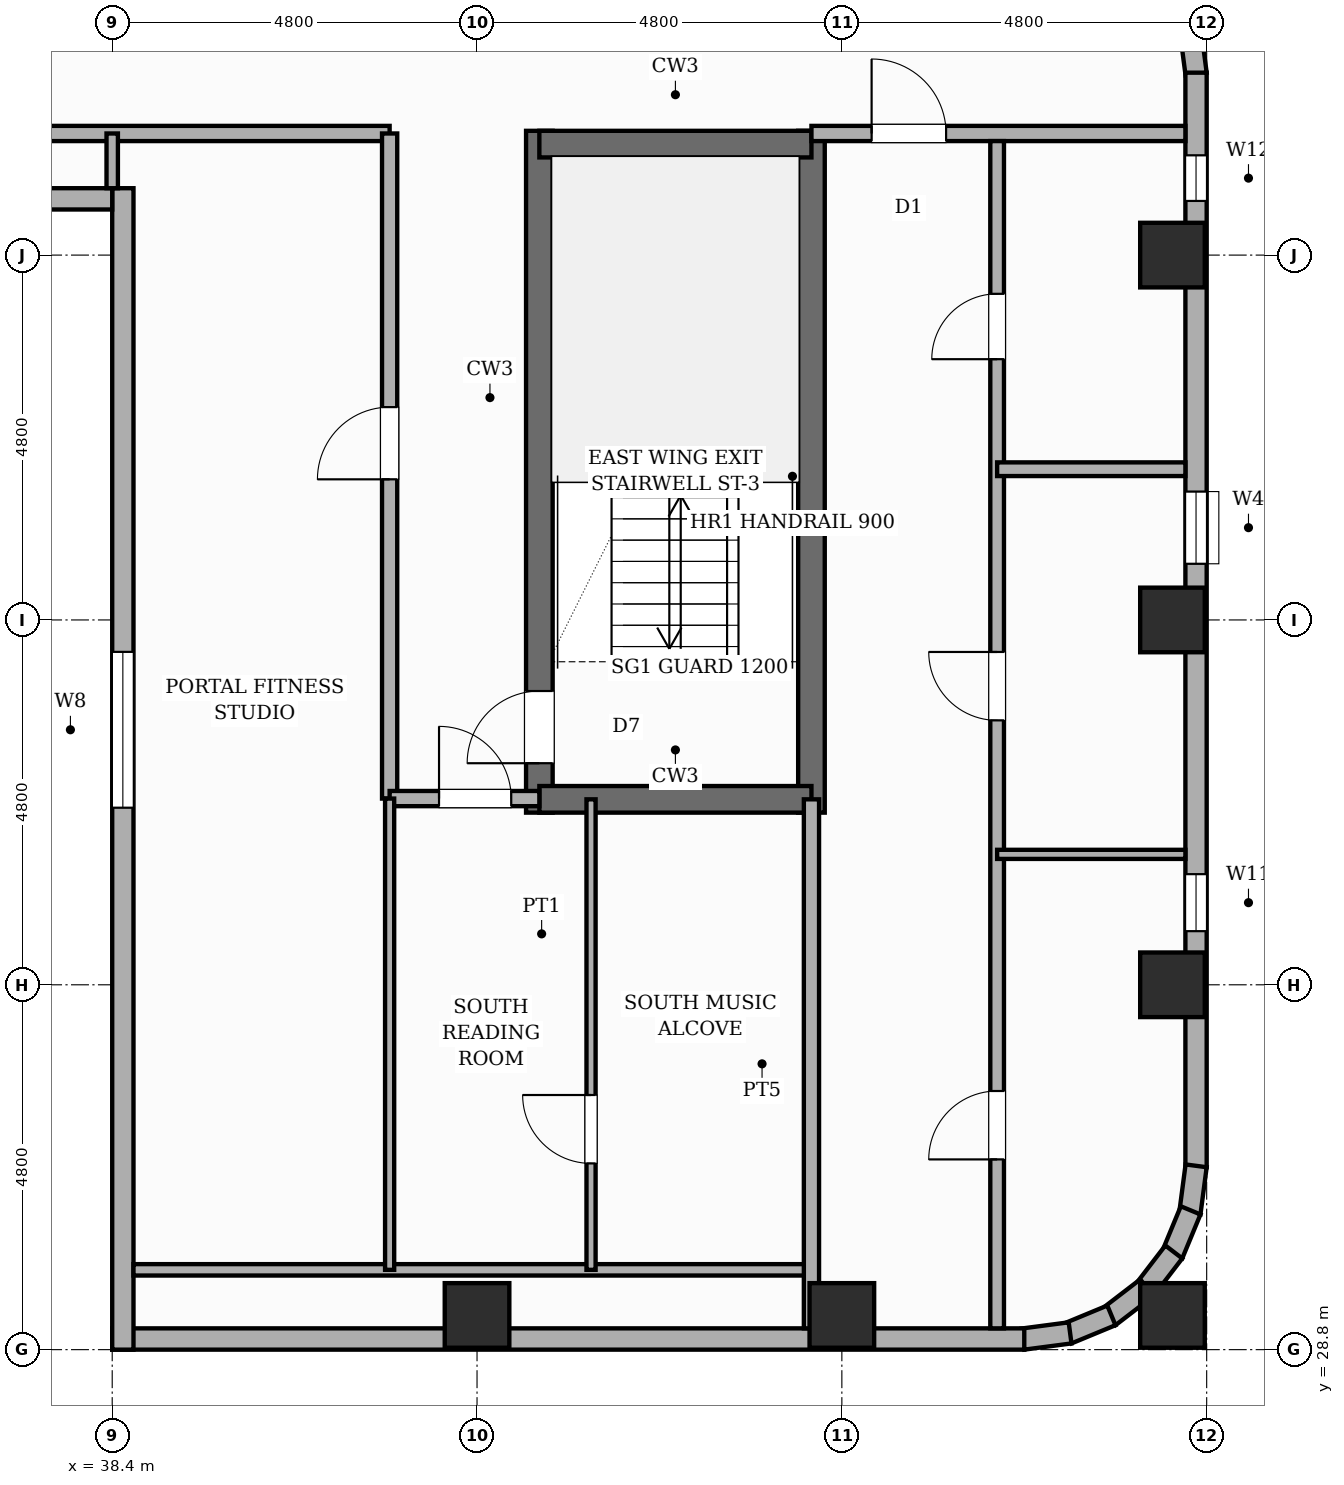
"""IFC4 building model, lengths in metres.
Left out: names, types, materials, properties, quantities, classifications, styles, units other than length and angle.
Written with IfcOpenShell. Run it as: python <this file> out.ifc"""

import sys

from ifc_helpers import new_model, si_unit, direction, frame, frame_2d, origin, origin_2d, place, context, subcontext, project, spatial, rectangle, extrude, element, fill, save


model = new_model("IFC4")
c1 = context("Model", 3, precision=1e-05, world=origin(), true_north=direction((0.0, 1.0)))
c2 = subcontext(c1, "Body", "Model", "MODEL_VIEW")
j1 = project(units=[si_unit("LENGTHUNIT", "METRE"), si_unit("PLANEANGLEUNIT", "RADIAN")], contexts=[c1])
p1 = place(None, origin())
s1 = spatial("IfcSite", under=j1, at=p1, CompositionType="ELEMENT")
p2 = place(p1, origin())
s2 = spatial("IfcBuilding", under=s1, at=p2, CompositionType="ELEMENT")
p3 = place(p2, frame((0.0, 0.0, 203.8)))
s3 = spatial("IfcBuildingStorey", under=s2, at=p3, CompositionType="ELEMENT", Elevation=203.8)
p4 = place(p3, frame((44.02, 35.865, 0.0), z_axis=(0.0, 0.0, 1.0), x_axis=(0.0, 1.0, 0.0)))
e1 = element("IfcWall", 1, at=p4, inside=s3, PredefinedType="SHEAR", context=c2, shape_type="SweptSolid", body=[
    extrude(rectangle(XDim=8.97, YDim=0.35, at=frame_2d((4.485, 0.0))), origin(), (0.0, 0.0, 1.0), 3.6),
])
p5 = place(p4, frame((0.65, 0.0, 0.0)))
e2 = element("IfcOpeningElement", 2, at=p5, cuts=e1, PredefinedType="OPENING", context=c2, shape_type="SweptSolid", body=[
    extrude(rectangle(XDim=0.95, YDim=2.1, at=frame_2d((0.475, 1.05))), frame((0.0, 0.185, 0.0), z_axis=(0.0, -1.0, 0.0), x_axis=(1.0, 0.0, 0.0)), (0.0, 0.0, 1.0), 0.37),
])
p6 = place(p3, frame((47.6, 35.865, 0.0), z_axis=(0.0, 0.0, 1.0), x_axis=(0.0, 1.0, 0.0)))
e3 = element("IfcWall", 3, at=p6, inside=s3, PredefinedType="SHEAR", context=c2, shape_type="SweptSolid", body=[
    extrude(rectangle(XDim=8.97, YDim=0.35, at=frame_2d((4.485, 0.0))), origin(), (0.0, 0.0, 1.0), 3.6),
])
for number, where, z_axis, x_axis in (
    (4, (44.02, 36.04, 0.0), (0.0, 0.0, 1.0), (1.0, 0.0, 0.0)),
    (5, (44.02, 44.66, 0.0), (0.0, 0.0, 1.0), (1.0, 0.0, 0.0)),
):
    element("IfcWall", number, at=place(p3, frame(where, z_axis=z_axis, x_axis=x_axis)), inside=s3, PredefinedType="SHEAR", context=c2, shape_type="SweptSolid", body=[
        extrude(rectangle(XDim=3.58, YDim=0.35, at=frame_2d((1.79, 0.0))), origin(), (0.0, 0.0, 1.0), 3.6),
    ])
for number, where, z_axis, x_axis in (
    (6, (43.2, 29.25, 0.0), (0.0, 0.0, 1.0), (1.0, 0.0, 0.0)),
    (7, (48.0, 29.25, 0.0), (0.0, 0.0, 1.0), (1.0, 0.0, 0.0)),
    (8, (52.35, 29.25, 0.0), (0.0, 0.0, 1.0), (1.0, 0.0, 0.0)),
    (9, (52.35, 33.6, 0.0), (0.0, 0.0, 1.0), (1.0, 0.0, 0.0)),
    (10, (52.35, 38.4, 0.0), (0.0, 0.0, 1.0), (1.0, 0.0, 0.0)),
    (11, (52.35, 43.2, 0.0), (0.0, 0.0, 1.0), (1.0, 0.0, 0.0)),
):
    element("IfcColumn", number, at=place(p3, frame(where, z_axis=z_axis, x_axis=x_axis)), inside=s3, PredefinedType="COLUMN", context=c2, shape_type="SweptSolid", body=[
        extrude(rectangle(XDim=0.85, YDim=0.85, at=origin_2d()), origin(), (0.0, 0.0, 1.0), 3.6),
    ])
p7 = place(p3, frame((52.579, 46.203, 0.0), z_axis=(0.0, 0.0, 1.0), x_axis=(0.130555323746, -0.9914410257, 0.0)))
e12 = element("IfcWall", 12, at=p7, inside=s3, PredefinedType="STANDARD", context=c2, shape_type="SweptSolid", body=[
    extrude(rectangle(XDim=0.626, YDim=0.28, at=frame_2d((0.313, 0.0))), origin(), (0.0, 0.0, 1.0), 2.66),
])
p8 = place(p3, frame((52.66, 45.6, 0.0), z_axis=(0.0, 0.0, 1.0), x_axis=(0.0, -1.0, 0.0)))
e13 = element("IfcWall", 13, at=p8, inside=s3, PredefinedType="STANDARD", context=c2, shape_type="SweptSolid", body=[
    extrude(rectangle(XDim=14.4, YDim=0.28, at=frame_2d((7.2, 0.0))), origin(), (0.0, 0.0, 1.0), 2.66),
])
p9 = place(p8, frame((10.544, 0.0, 0.45)))
e14 = element("IfcOpeningElement", 14, at=p9, cuts=e13, PredefinedType="OPENING", context=c2, shape_type="SweptSolid", body=[
    extrude(rectangle(XDim=0.75, YDim=1.8, at=frame_2d((0.375, 0.9))), frame((0.0, 0.15, 0.0), z_axis=(0.0, -1.0, 0.0), x_axis=(1.0, 0.0, 0.0)), (0.0, 0.0, 1.0), 0.3),
])
p10 = place(p8, frame((1.087, 0.0, 0.45)))
e15 = element("IfcOpeningElement", 15, at=p10, cuts=e13, PredefinedType="OPENING", context=c2, shape_type="SweptSolid", body=[
    extrude(rectangle(XDim=0.6, YDim=1.8, at=frame_2d((0.3, 0.9))), frame((0.0, 0.15, 0.0), z_axis=(0.0, -1.0, 0.0), x_axis=(1.0, 0.0, 0.0)), (0.0, 0.0, 1.0), 0.3),
])
p11 = place(p8, frame((5.511, 0.0, 0.45)))
e16 = element("IfcOpeningElement", 16, at=p11, cuts=e13, PredefinedType="OPENING", context=c2, shape_type="SweptSolid", body=[
    extrude(rectangle(XDim=0.95, YDim=1.8, at=frame_2d((0.475, 0.9))), frame((0.0, 0.15, 0.0), z_axis=(0.0, -1.0, 0.0), x_axis=(1.0, 0.0, 0.0)), (0.0, 0.0, 1.0), 0.3),
])
p12 = place(p3, frame((52.661, 31.218, 0.0), z_axis=(0.0, 0.0, 1.0), x_axis=(-0.130555323746, -0.9914410257, 0.0)))
e17 = element("IfcWall", 17, at=p12, inside=s3, PredefinedType="STANDARD", context=c2, shape_type="SweptSolid", body=[
    extrude(rectangle(XDim=0.626, YDim=0.28, at=frame_2d((0.313, 0.0))), origin(), (0.0, 0.0, 1.0), 2.66),
])
p13 = place(p3, frame((52.589, 30.632, 0.0), z_axis=(0.0, 0.0, 1.0), x_axis=(-0.382787856107, -0.923836271867, 0.0)))
e18 = element("IfcWall", 18, at=p13, inside=s3, PredefinedType="STANDARD", context=c2, shape_type="SweptSolid", body=[
    extrude(rectangle(XDim=0.626, YDim=0.28, at=frame_2d((0.313, 0.0))), origin(), (0.0, 0.0, 1.0), 2.66),
])
for number, where, z_axis, x_axis in (
    (19, (52.367, 30.085, 0.0), (0.0, 0.0, 1.0), (-0.609, -0.793, 0.0)),
    (20, (52.012, 29.614, 0.0), (0.0, 0.0, 1.0), (-0.793, -0.609, 0.0)),
    (21, (51.546, 29.251, 0.0), (0.0, 0.0, 1.0), (-0.924, -0.383, 0.0)),
):
    element("IfcWall", number, at=place(p3, frame(where, z_axis=z_axis, x_axis=x_axis)), inside=s3, PredefinedType="STANDARD", context=c2, shape_type="SweptSolid", body=[
        extrude(rectangle(XDim=0.626, YDim=0.28, at=frame_2d((0.313, 0.0))), origin(), (0.0, 0.0, 1.0), 2.66),
    ])
p14 = place(p3, frame((51.003, 29.021, 0.0), z_axis=(0.0, 0.0, 1.0), x_axis=(-0.991447664465, -0.130504898859, 0.0)))
e22 = element("IfcWall", 22, at=p14, inside=s3, PredefinedType="STANDARD", context=c2, shape_type="SweptSolid", body=[
    extrude(rectangle(XDim=0.627, YDim=0.28, at=frame_2d((0.313, 0.0))), origin(), (0.0, 0.0, 1.0), 2.66),
])
p15 = place(p3, frame((50.4, 28.94, 0.0), z_axis=(0.0, 0.0, 1.0), x_axis=(-1.0, 0.0, 0.0)))
e23 = element("IfcWall", 23, at=p15, inside=s3, PredefinedType="STANDARD", context=c2, shape_type="SweptSolid", body=[
    extrude(rectangle(XDim=12.0, YDim=0.28, at=frame_2d((6.0, 0.0))), origin(), (0.0, 0.0, 1.0), 1.78),
])
p16 = place(p3, frame((38.54, 28.8, 0.0), z_axis=(0.0, 0.0, 1.0), x_axis=(0.0, 1.0, 0.0)))
e24 = element("IfcWall", 24, at=p16, inside=s3, PredefinedType="STANDARD", context=c2, shape_type="SweptSolid", body=[
    extrude(rectangle(XDim=15.28, YDim=0.28, at=frame_2d((7.64, 0.0))), origin(), (0.0, 0.0, 1.0), 3.38),
])
p17 = place(p16, frame((7.13, 0.0, 0.8)))
e25 = element("IfcOpeningElement", 25, at=p17, cuts=e24, PredefinedType="OPENING", context=c2, shape_type="SweptSolid", body=[
    extrude(rectangle(XDim=2.05, YDim=1.95, at=frame_2d((1.025, 0.975))), frame((0.0, 0.15, 0.0), z_axis=(0.0, -1.0, 0.0), x_axis=(1.0, 0.0, 0.0)), (0.0, 0.0, 1.0), 0.3),
])
p18 = place(p3, frame((38.4, 43.94, 0.0), z_axis=(0.0, 0.0, 1.0), x_axis=(-1.0, 0.0, 0.0)))
e26 = element("IfcWall", 26, at=p18, inside=s3, PredefinedType="STANDARD", context=c2, shape_type="SweptSolid", body=[
    extrude(rectangle(XDim=12.28, YDim=0.28, at=frame_2d((6.14, 0.0))), origin(), (0.0, 0.0, 1.0), 3.38),
])
p19 = place(p18, frame((5.115, 0.0, 0.8)))
e27 = element("IfcOpeningElement", 27, at=p19, cuts=e26, PredefinedType="OPENING", context=c2, shape_type="SweptSolid", body=[
    extrude(rectangle(XDim=2.05, YDim=1.95, at=frame_2d((1.025, 0.975))), frame((0.0, 0.15, 0.0), z_axis=(0.0, -1.0, 0.0), x_axis=(1.0, 0.0, 0.0)), (0.0, 0.0, 1.0), 0.3),
])
p20 = place(p3, frame((24.75, 44.8, 0.0), z_axis=(0.0, 0.0, 1.0), x_axis=(1.0, 0.0, 0.0)))
e28 = element("IfcWall", 28, at=p20, inside=s3, PredefinedType="PARTITIONING", context=c2, shape_type="SweptSolid", body=[
    extrude(rectangle(XDim=17.3, YDim=0.2, at=frame_2d((8.65, 0.0))), origin(), (0.0, 0.0, 1.0), 3.38),
])
p21 = place(p20, frame((6.2, 0.0, 0.0)))
e29 = element("IfcOpeningElement", 29, at=p21, cuts=e28, PredefinedType="OPENING", context=c2, shape_type="SweptSolid", body=[
    extrude(rectangle(XDim=0.95, YDim=2.15, at=frame_2d((0.475, 1.075))), frame((0.0, 0.11, 0.0), z_axis=(0.0, -1.0, 0.0), x_axis=(1.0, 0.0, 0.0)), (0.0, 0.0, 1.0), 0.22),
])
p22 = place(p3, frame((38.4, 44.08, 0.0), z_axis=(0.0, 0.0, 1.0), x_axis=(0.0, 1.0, 0.0)))
e30 = element("IfcWall", 30, at=p22, inside=s3, PredefinedType="PARTITIONING", context=c2, shape_type="SweptSolid", body=[
    extrude(rectangle(XDim=0.72, YDim=0.15, at=frame_2d((0.36, 0.0))), origin(), (0.0, 0.0, 1.0), 3.38),
])
p23 = place(p3, frame((47.6, 44.8, 0.0), z_axis=(0.0, 0.0, 1.0), x_axis=(1.0, 0.0, 0.0)))
e31 = element("IfcWall", 31, at=p23, inside=s3, PredefinedType="PARTITIONING", context=c2, shape_type="SweptSolid", body=[
    extrude(rectangle(XDim=4.92, YDim=0.2, at=frame_2d((2.46, 0.0))), origin(), (0.0, 0.0, 1.0), 3.38),
])
p24 = place(p23, frame((0.792, 0.0, 0.0)))
e32 = element("IfcOpeningElement", 32, at=p24, cuts=e31, PredefinedType="OPENING", context=c2, shape_type="SweptSolid", body=[
    extrude(rectangle(XDim=0.98, YDim=2.18, at=frame_2d((0.49, 1.09))), frame((0.0, 0.11, 0.0), z_axis=(0.0, -1.0, 0.0), x_axis=(1.0, 0.0, 0.0)), (0.0, 0.0, 1.0), 0.22),
])
p25 = place(p3, frame((42.05, 36.05, 0.0), z_axis=(0.0, 0.0, 1.0), x_axis=(0.0, 1.0, 0.0)))
e33 = element("IfcWall", 33, at=p25, inside=s3, PredefinedType="PARTITIONING", context=c2, shape_type="SweptSolid", body=[
    extrude(rectangle(XDim=8.75, YDim=0.2, at=frame_2d((4.375, 0.0))), origin(), (0.0, 0.0, 1.0), 3.38),
])
p26 = place(p25, frame((4.2, 0.0, 0.0)))
e34 = element("IfcOpeningElement", 34, at=p26, cuts=e33, PredefinedType="OPENING", context=c2, shape_type="SweptSolid", body=[
    extrude(rectangle(XDim=0.95, YDim=2.15, at=frame_2d((0.475, 1.075))), frame((0.0, 0.11, 0.0), z_axis=(0.0, -1.0, 0.0), x_axis=(1.0, 0.0, 0.0)), (0.0, 0.0, 1.0), 0.22),
])
p27 = place(p3, frame((42.05, 36.05, 0.0), z_axis=(0.0, 0.0, 1.0), x_axis=(1.0, 0.0, 0.0)))
e35 = element("IfcWall", 35, at=p27, inside=s3, PredefinedType="PARTITIONING", context=c2, shape_type="SweptSolid", body=[
    extrude(rectangle(XDim=1.97, YDim=0.2, at=frame_2d((0.985, 0.0))), origin(), (0.0, 0.0, 1.0), 3.38),
])
p28 = place(p27, frame((0.65, 0.0, 0.0)))
e36 = element("IfcOpeningElement", 36, at=p28, cuts=e35, PredefinedType="OPENING", context=c2, shape_type="SweptSolid", body=[
    extrude(rectangle(XDim=0.95, YDim=2.15, at=frame_2d((0.475, 1.075))), frame((0.0, 0.11, 0.0), z_axis=(0.0, -1.0, 0.0), x_axis=(1.0, 0.0, 0.0)), (0.0, 0.0, 1.0), 0.22),
])
p29 = place(p3, frame((38.68, 29.85, 0.0), z_axis=(0.0, 0.0, 1.0), x_axis=(1.0, 0.0, 0.0)))
e37 = element("IfcWall", 37, at=p29, inside=s3, PredefinedType="PARTITIONING", context=c2, shape_type="SweptSolid", body=[
    extrude(rectangle(XDim=8.92, YDim=0.15, at=frame_2d((4.46, 0.0))), origin(), (0.0, 0.0, 1.0), 1.78),
])
p30 = place(p3, frame((44.7, 29.85, 0.0), z_axis=(0.0, 0.0, 1.0), x_axis=(0.0, 1.0, 0.0)))
e38 = element("IfcWall", 38, at=p30, inside=s3, PredefinedType="PARTITIONING", context=c2, shape_type="SweptSolid", body=[
    extrude(rectangle(XDim=6.19, YDim=0.12, at=frame_2d((3.095, 0.0))), origin(), (0.0, 0.0, 1.0), 3.38),
])
p31 = place(p30, frame((1.4, 0.0, 0.0)))
e39 = element("IfcOpeningElement", 39, at=p31, cuts=e38, PredefinedType="OPENING", context=c2, shape_type="SweptSolid", body=[
    extrude(rectangle(XDim=0.9, YDim=2.15, at=frame_2d((0.45, 1.075))), frame((0.0, 0.07, 0.0), z_axis=(0.0, -1.0, 0.0), x_axis=(1.0, 0.0, 0.0)), (0.0, 0.0, 1.0), 0.14),
])
p32 = place(p3, frame((42.05, 29.85, 0.0), z_axis=(0.0, 0.0, 1.0), x_axis=(0.0, 1.0, 0.0)))
e40 = element("IfcWall", 40, at=p32, inside=s3, PredefinedType="PARTITIONING", context=c2, shape_type="SweptSolid", body=[
    extrude(rectangle(XDim=6.2, YDim=0.12, at=frame_2d((3.1, 0.0))), origin(), (0.0, 0.0, 1.0), 3.38),
])
p33 = place(p3, frame((47.6, 29.08, 0.0), z_axis=(0.0, 0.0, 1.0), x_axis=(0.0, 1.0, 0.0)))
e41 = element("IfcWall", 41, at=p33, inside=s3, PredefinedType="SOLIDWALL", context=c2, shape_type="SweptSolid", body=[
    extrude(rectangle(XDim=6.96, YDim=0.2, at=frame_2d((3.48, 0.0))), origin(), (0.0, 0.0, 1.0), 3.38),
])
p34 = place(p3, frame((50.043, 29.08, 0.0), z_axis=(0.0, 0.0, 1.0), x_axis=(0.0, 1.0, 0.0)))
e42 = element("IfcWall", 42, at=p34, inside=s3, PredefinedType="PLUMBINGWALL", context=c2, shape_type="SweptSolid", body=[
    extrude(rectangle(XDim=15.62, YDim=0.18, at=frame_2d((7.81, 0.0))), origin(), (0.0, 0.0, 1.0), 3.38),
])
p35 = place(p34, frame((2.223, 0.0, 0.0)))
e43 = element("IfcOpeningElement", 43, at=p35, cuts=e42, PredefinedType="OPENING", context=c2, shape_type="SweptSolid", body=[
    extrude(rectangle(XDim=0.9, YDim=2.15, at=frame_2d((0.45, 1.075))), frame((0.0, 0.1, 0.0), z_axis=(0.0, -1.0, 0.0), x_axis=(1.0, 0.0, 0.0)), (0.0, 0.0, 1.0), 0.2),
])
p36 = place(p34, frame((7.999, 0.0, 0.0)))
e44 = element("IfcOpeningElement", 44, at=p36, cuts=e42, PredefinedType="OPENING", context=c2, shape_type="SweptSolid", body=[
    extrude(rectangle(XDim=0.9, YDim=2.15, at=frame_2d((0.45, 1.075))), frame((0.0, 0.1, 0.0), z_axis=(0.0, -1.0, 0.0), x_axis=(1.0, 0.0, 0.0)), (0.0, 0.0, 1.0), 0.2),
])
p37 = place(p34, frame((12.75, 0.0, 0.0)))
e45 = element("IfcOpeningElement", 45, at=p37, cuts=e42, PredefinedType="OPENING", context=c2, shape_type="SweptSolid", body=[
    extrude(rectangle(XDim=0.86, YDim=2.1, at=frame_2d((0.43, 1.05))), frame((0.0, 0.1, 0.0), z_axis=(0.0, -1.0, 0.0), x_axis=(1.0, 0.0, 0.0)), (0.0, 0.0, 1.0), 0.2),
])
p38 = place(p3, frame((50.043, 35.316, 0.0), z_axis=(0.0, 0.0, 1.0), x_axis=(1.0, 0.0, 0.0)))
e46 = element("IfcWall", 46, at=p38, inside=s3, PredefinedType="PARTITIONING", context=c2, shape_type="SweptSolid", body=[
    extrude(rectangle(XDim=2.477, YDim=0.12, at=frame_2d((1.239, 0.0))), origin(), (0.0, 0.0, 1.0), 3.38),
])
p39 = place(p3, frame((50.043, 40.383, 0.0), z_axis=(0.0, 0.0, 1.0), x_axis=(1.0, 0.0, 0.0)))
e47 = element("IfcWall", 47, at=p39, inside=s3, PredefinedType="PLUMBINGWALL", context=c2, shape_type="SweptSolid", body=[
    extrude(rectangle(XDim=2.477, YDim=0.18, at=frame_2d((1.239, 0.0))), origin(), (0.0, 0.0, 1.0), 3.38),
])
p40 = place(p9, origin())
e48 = element("IfcWindow", 48, at=p40, inside=s3, PartitioningType="SINGLE_PANEL", PredefinedType="WINDOW", context=c2, shape_type="SweptSolid", body=[
    extrude(rectangle(XDim=0.75, YDim=1.8, at=frame_2d((0.375, 0.9))), frame((0.0, 0.03, 0.0), z_axis=(0.0, -1.0, 0.0), x_axis=(1.0, 0.0, 0.0)), (0.0, 0.0, 1.0), 0.06),
])
fill(e14, e48)
p41 = place(p10, origin())
e49 = element("IfcWindow", 49, at=p41, inside=s3, PartitioningType="SINGLE_PANEL", PredefinedType="WINDOW", context=c2, shape_type="SweptSolid", body=[
    extrude(rectangle(XDim=0.6, YDim=1.8, at=frame_2d((0.3, 0.9))), frame((0.0, 0.03, 0.0), z_axis=(0.0, -1.0, 0.0), x_axis=(1.0, 0.0, 0.0)), (0.0, 0.0, 1.0), 0.06),
])
fill(e15, e49)
p42 = place(p11, origin())
e50 = element("IfcWindow", 50, at=p42, inside=s3, PartitioningType="SINGLE_PANEL", PredefinedType="WINDOW", context=c2, shape_type="SweptSolid", body=[
    extrude(rectangle(XDim=0.95, YDim=1.8, at=frame_2d((0.475, 0.9))), frame((0.0, 0.03, 0.0), z_axis=(0.0, -1.0, 0.0), x_axis=(1.0, 0.0, 0.0)), (0.0, 0.0, 1.0), 0.06),
])
fill(e16, e50)
p43 = place(p17, origin())
e51 = element("IfcWindow", 51, at=p43, inside=s3, PartitioningType="SINGLE_PANEL", PredefinedType="WINDOW", context=c2, shape_type="SweptSolid", body=[
    extrude(rectangle(XDim=2.05, YDim=1.95, at=frame_2d((1.025, 0.975))), frame((0.0, 0.03, 0.0), z_axis=(0.0, -1.0, 0.0), x_axis=(1.0, 0.0, 0.0)), (0.0, 0.0, 1.0), 0.06),
])
fill(e25, e51)
p44 = place(p5, origin())
e52 = element("IfcDoor", 52, at=p44, inside=s3, OperationType="SINGLE_SWING_LEFT", PredefinedType="DOOR", context=c2, shape_type="SweptSolid", body=[
    extrude(rectangle(XDim=0.95, YDim=2.1, at=frame_2d((0.475, 1.05))), frame((0.0, 0.025, 0.0), z_axis=(0.0, -1.0, 0.0), x_axis=(1.0, 0.0, 0.0)), (0.0, 0.0, 1.0), 0.05),
])
fill(e2, e52)
p45 = place(p26, origin())
e53 = element("IfcDoor", 53, at=p45, inside=s3, OperationType="SINGLE_SWING_LEFT", PredefinedType="DOOR", context=c2, shape_type="SweptSolid", body=[
    extrude(rectangle(XDim=0.95, YDim=2.15, at=frame_2d((0.475, 1.075))), frame((0.0, 0.025, 0.0), z_axis=(0.0, -1.0, 0.0), x_axis=(1.0, 0.0, 0.0)), (0.0, 0.0, 1.0), 0.05),
])
fill(e34, e53)
p46 = place(p28, origin())
e54 = element("IfcDoor", 54, at=p46, inside=s3, OperationType="SINGLE_SWING_LEFT", PredefinedType="DOOR", context=c2, shape_type="SweptSolid", body=[
    extrude(rectangle(XDim=0.95, YDim=2.15, at=frame_2d((0.475, 1.075))), frame((0.0, 0.025, 0.0), z_axis=(0.0, -1.0, 0.0), x_axis=(1.0, 0.0, 0.0)), (0.0, 0.0, 1.0), 0.05),
])
fill(e36, e54)
p47 = place(p31, origin())
e55 = element("IfcDoor", 55, at=p47, inside=s3, OperationType="SINGLE_SWING_RIGHT", PredefinedType="DOOR", context=c2, shape_type="SweptSolid", body=[
    extrude(rectangle(XDim=0.9, YDim=2.15, at=frame_2d((0.45, 1.075))), frame((0.0, 0.025, 0.0), z_axis=(0.0, -1.0, 0.0), x_axis=(1.0, 0.0, 0.0)), (0.0, 0.0, 1.0), 0.05),
])
fill(e39, e55)
p48 = place(p24, origin())
e56 = element("IfcDoor", 56, at=p48, inside=s3, OperationType="SINGLE_SWING_LEFT", PredefinedType="DOOR", context=c2, shape_type="SweptSolid", body=[
    extrude(rectangle(XDim=0.98, YDim=2.18, at=frame_2d((0.49, 1.09))), frame((0.0, 0.025, 0.0), z_axis=(0.0, -1.0, 0.0), x_axis=(1.0, 0.0, 0.0)), (0.0, 0.0, 1.0), 0.05),
])
fill(e32, e56)
p49 = place(p35, origin())
e57 = element("IfcDoor", 57, at=p49, inside=s3, OperationType="SINGLE_SWING_LEFT", PredefinedType="DOOR", context=c2, shape_type="SweptSolid", body=[
    extrude(rectangle(XDim=0.9, YDim=2.15, at=frame_2d((0.45, 1.075))), frame((0.0, 0.025, 0.0), z_axis=(0.0, -1.0, 0.0), x_axis=(1.0, 0.0, 0.0)), (0.0, 0.0, 1.0), 0.05),
])
fill(e43, e57)
p50 = place(p36, origin())
e58 = element("IfcDoor", 58, at=p50, inside=s3, OperationType="SINGLE_SWING_RIGHT", PredefinedType="DOOR", context=c2, shape_type="SweptSolid", body=[
    extrude(rectangle(XDim=0.9, YDim=2.15, at=frame_2d((0.45, 1.075))), frame((0.0, 0.025, 0.0), z_axis=(0.0, -1.0, 0.0), x_axis=(1.0, 0.0, 0.0)), (0.0, 0.0, 1.0), 0.05),
])
fill(e44, e58)
p51 = place(p37, origin())
e59 = element("IfcDoor", 59, at=p51, inside=s3, OperationType="SINGLE_SWING_LEFT", PredefinedType="DOOR", context=c2, shape_type="SweptSolid", body=[
    extrude(rectangle(XDim=0.86, YDim=2.1, at=frame_2d((0.43, 1.05))), frame((0.0, 0.025, 0.0), z_axis=(0.0, -1.0, 0.0), x_axis=(1.0, 0.0, 0.0)), (0.0, 0.0, 1.0), 0.05),
])
fill(e45, e59)
save(model, sys.argv[1])
